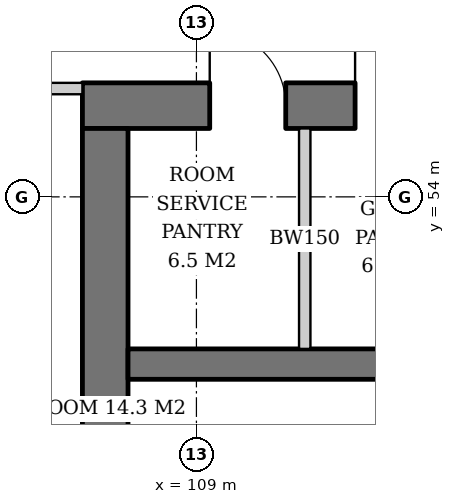
"""IFC4 building model, lengths in metres.
Left out: names, types, materials, properties, quantities, classifications, styles, units other than length and angle.
Written with IfcOpenShell. Run it as: python <this file> out.ifc"""

import sys

from ifc_helpers import new_model, si_unit, direction, frame, frame_2d, origin, place, context, subcontext, project, spatial, rectangle, extrude, element, fill, save


model = new_model("IFC4")
c1 = context("Model", 3, precision=1e-05, world=origin(), true_north=direction((0.0, 1.0)))
c2 = subcontext(c1, "Body", "Model", "MODEL_VIEW")
j1 = project(units=[si_unit("LENGTHUNIT", "METRE"), si_unit("PLANEANGLEUNIT", "RADIAN")], contexts=[c1])
p1 = place(None, origin())
s1 = spatial("IfcSite", under=j1, at=p1, CompositionType="ELEMENT")
p2 = place(p1, origin())
s2 = spatial("IfcBuilding", under=s1, at=p2, CompositionType="ELEMENT")
p3 = place(p2, frame((0.0, 0.0, 40.0)))
s3 = spatial("IfcBuildingStorey", under=s2, at=p3, CompositionType="ELEMENT", Elevation=40.0)
p4 = place(p3, frame((107.5, 55.2, 0.0), z_axis=(0.0, 0.0, 1.0), x_axis=(1.0, 0.0, 0.0)))
e1 = element("IfcWall", 1, at=p4, inside=s3, PredefinedType="SHEAR", context=c2, shape_type="SweptSolid", body=[
    extrude(rectangle(XDim=19.0, YDim=0.6, at=frame_2d((9.5, 0.0))), origin(), (0.0, 0.0, 1.0), 3.8),
])
p5 = place(p4, frame((14.14, 0.0, 0.0)))
e2 = element("IfcOpeningElement", 2, at=p5, cuts=e1, PredefinedType="OPENING", context=c2, shape_type="SweptSolid", body=[
    extrude(rectangle(XDim=1.0, YDim=2.1, at=frame_2d((0.5, 1.05))), frame((0.0, 0.31, 0.0), z_axis=(0.0, -1.0, 0.0), x_axis=(1.0, 0.0, 0.0)), (0.0, 0.0, 1.0), 0.62),
])
p6 = place(p4, frame((1.675, 0.0, 0.0)))
e3 = element("IfcOpeningElement", 3, at=p6, cuts=e1, PredefinedType="OPENING", context=c2, shape_type="SweptSolid", body=[
    extrude(rectangle(XDim=1.0, YDim=2.1, at=frame_2d((0.5, 1.05))), frame((0.0, 0.31, 0.0), z_axis=(0.0, -1.0, 0.0), x_axis=(1.0, 0.0, 0.0)), (0.0, 0.0, 1.0), 0.62),
])
p7 = place(p4, frame((3.587, 0.0, 0.0)))
e4 = element("IfcOpeningElement", 4, at=p7, cuts=e1, PredefinedType="OPENING", context=c2, shape_type="SweptSolid", body=[
    extrude(rectangle(XDim=1.0, YDim=2.1, at=frame_2d((0.5, 1.05))), frame((0.0, 0.31, 0.0), z_axis=(0.0, -1.0, 0.0), x_axis=(1.0, 0.0, 0.0)), (0.0, 0.0, 1.0), 0.62),
])
p8 = place(p3, frame((107.8, 37.1, 0.0), z_axis=(0.0, 0.0, 1.0), x_axis=(0.0, 1.0, 0.0)))
e5 = element("IfcWall", 5, at=p8, inside=s3, PredefinedType="SHEAR", context=c2, shape_type="SweptSolid", body=[
    extrude(rectangle(XDim=17.8, YDim=0.6, at=frame_2d((8.9, 0.0))), origin(), (0.0, 0.0, 1.0), 3.8),
])
p9 = place(p8, frame((8.0, 0.0, 0.0)))
e6 = element("IfcOpeningElement", 6, at=p9, cuts=e5, PredefinedType="OPENING", context=c2, shape_type="SweptSolid", body=[
    extrude(rectangle(XDim=1.8, YDim=2.4, at=frame_2d((0.9, 1.2))), frame((0.0, 0.31, 0.0), z_axis=(0.0, -1.0, 0.0), x_axis=(1.0, 0.0, 0.0)), (0.0, 0.0, 1.0), 0.62),
])
p10 = place(p3, frame((108.1, 51.8, 0.0), z_axis=(0.0, 0.0, 1.0), x_axis=(1.0, 0.0, 0.0)))
e7 = element("IfcWall", 7, at=p10, inside=s3, PredefinedType="SHEAR", context=c2, shape_type="SweptSolid", body=[
    extrude(rectangle(XDim=17.8, YDim=0.4, at=frame_2d((8.9, 0.0))), origin(), (0.0, 0.0, 1.0), 3.8),
])
p11 = place(p3, frame((110.425, 52.0, 0.0), z_axis=(0.0, 0.0, 1.0), x_axis=(0.0, 1.0, 0.0)))
e8 = element("IfcWall", 8, at=p11, inside=s3, PredefinedType="SOLIDWALL", context=c2, shape_type="SweptSolid", body=[
    extrude(rectangle(XDim=2.9, YDim=0.15, at=frame_2d((1.45, 0.0))), origin(), (0.0, 0.0, 1.0), 3.6),
])
p12 = place(p3, frame((107.5, 55.425, 0.0), z_axis=(0.0, 0.0, 1.0), x_axis=(-1.0, 0.0, 0.0)))
e9 = element("IfcWall", 9, at=p12, inside=s3, PredefinedType="PARTITIONING", context=c2, shape_type="SweptSolid", body=[
    extrude(rectangle(XDim=1.875, YDim=0.15, at=frame_2d((0.938, 0.0))), origin(), (0.0, 0.0, 1.0), 2.8),
])
p13 = place(p6, origin())
e10 = element("IfcDoor", 10, at=p13, inside=s3, OperationType="SINGLE_SWING_LEFT", PredefinedType="DOOR", context=c2, shape_type="SweptSolid", body=[
    extrude(rectangle(XDim=1.0, YDim=2.1, at=frame_2d((0.5, 1.05))), frame((0.0, -0.24, 0.0), z_axis=(0.0, -1.0, 0.0), x_axis=(1.0, 0.0, 0.0)), (0.0, 0.0, 1.0), 0.05),
])
fill(e3, e10)
p14 = place(p7, origin())
e11 = element("IfcDoor", 11, at=p14, inside=s3, OperationType="SINGLE_SWING_LEFT", PredefinedType="DOOR", context=c2, shape_type="SweptSolid", body=[
    extrude(rectangle(XDim=1.0, YDim=2.1, at=frame_2d((0.5, 1.05))), frame((0.0, -0.24, 0.0), z_axis=(0.0, -1.0, 0.0), x_axis=(1.0, 0.0, 0.0)), (0.0, 0.0, 1.0), 0.05),
])
fill(e4, e11)
save(model, sys.argv[1])
